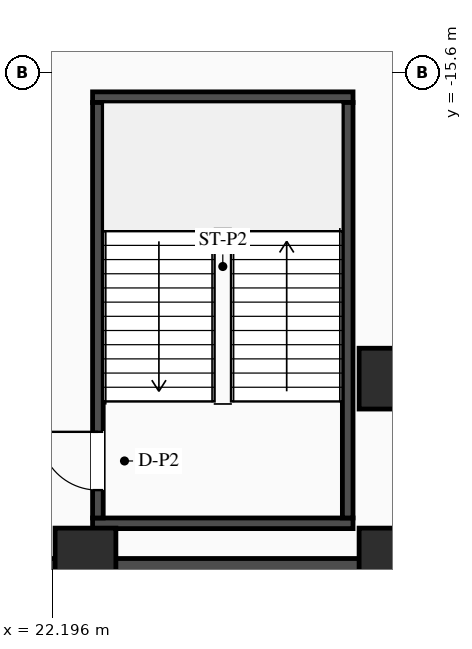
"""IFC4 building model, lengths in metres.
Left out: names, types, materials, properties, quantities, classifications, styles, units other than length and angle.
Written with IfcOpenShell. Run it as: python <this file> out.ifc"""

import sys

from ifc_helpers import new_model, si_unit, direction, frame, frame_2d, origin, origin_2d, place, context, subcontext, project, spatial, rectangle, extrude, element, fill, save


model = new_model("IFC4")
c1 = context("Model", 3, precision=1e-05, world=origin(), true_north=direction((0.0, 1.0)))
c2 = subcontext(c1, "Body", "Model", "MODEL_VIEW")
j1 = project(units=[si_unit("LENGTHUNIT", "METRE"), si_unit("PLANEANGLEUNIT", "RADIAN")], contexts=[c1])
p1 = place(None, origin())
s1 = spatial("IfcSite", under=j1, at=p1, CompositionType="ELEMENT")
p2 = place(p1, origin())
s2 = spatial("IfcBuilding", under=s1, at=p2, CompositionType="ELEMENT")
p3 = place(p2, frame((0.0, 0.0, -9.6)))
s3 = spatial("IfcBuildingStorey", under=s2, at=p3, CompositionType="ELEMENT", Elevation=-9.6)
p4 = place(p3, frame((-39.0, -25.6, 0.0), z_axis=(0.0, 0.0, 1.0), x_axis=(1.0, 0.0, 0.0)))
e1 = element("IfcWall", 1, at=p4, inside=s3, PredefinedType="SOLIDWALL", context=c2, shape_type="SweptSolid", body=[
    extrude(rectangle(XDim=78.0, YDim=0.8, at=frame_2d((39.0, 0.0))), origin(), (0.0, 0.0, 1.0), 4.5),
])
for number, where, z_axis, x_axis in (
    (2, (22.99, -24.505, 0.0), (0.0, 0.0, 1.0), (1.0, 0.0, 0.0)),
    (3, (22.99, -16.095, 0.0), (0.0, 0.0, 1.0), (1.0, 0.0, 0.0)),
):
    element("IfcWall", number, at=place(p3, frame(where, z_axis=z_axis, x_axis=x_axis)), inside=s3, PredefinedType="SHEAR", context=c2, shape_type="SweptSolid", body=[
        extrude(rectangle(XDim=5.14, YDim=0.21, at=frame_2d((2.57, 0.0))), origin(), (0.0, 0.0, 1.0), 4.5),
    ])
p5 = place(p3, frame((23.095, -24.4, 0.0), z_axis=(0.0, 0.0, 1.0), x_axis=(0.0, 1.0, 0.0)))
e4 = element("IfcWall", 4, at=p5, inside=s3, PredefinedType="SHEAR", context=c2, shape_type="SweptSolid", body=[
    extrude(rectangle(XDim=8.2, YDim=0.21, at=frame_2d((4.1, 0.0))), origin(), (0.0, 0.0, 1.0), 4.5),
])
p6 = place(p5, frame((0.55, 0.0, 0.0)))
e5 = element("IfcOpeningElement", 5, at=p6, cuts=e4, PredefinedType="OPENING", context=c2, shape_type="SweptSolid", body=[
    extrude(rectangle(XDim=1.15, YDim=2.1, at=frame_2d((0.575, 1.05))), frame((0.0, 0.115, 0.0), z_axis=(0.0, -1.0, 0.0), x_axis=(1.0, 0.0, 0.0)), (0.0, 0.0, 1.0), 0.23),
])
p7 = place(p3, frame((28.025, -24.4, 0.0), z_axis=(0.0, 0.0, 1.0), x_axis=(0.0, 1.0, 0.0)))
e6 = element("IfcWall", 6, at=p7, inside=s3, PredefinedType="SHEAR", context=c2, shape_type="SweptSolid", body=[
    extrude(rectangle(XDim=8.2, YDim=0.21, at=frame_2d((4.1, 0.0))), origin(), (0.0, 0.0, 1.0), 4.5),
])
for number, where, z_axis, x_axis in (
    (7, (28.85, -21.65, 0.0), (0.0, 0.0, 1.0), (1.0, 0.0, 0.0)),
    (8, (22.85, -25.2, 0.0), (0.0, 0.0, 1.0), (1.0, 0.0, 0.0)),
    (9, (28.85, -25.2, 0.0), (0.0, 0.0, 1.0), (1.0, 0.0, 0.0)),
):
    element("IfcColumn", number, at=place(p3, frame(where, z_axis=z_axis, x_axis=x_axis)), inside=s3, PredefinedType="COLUMN", context=c2, shape_type="SweptSolid", body=[
        extrude(rectangle(XDim=1.2, YDim=1.2, at=origin_2d()), origin(), (0.0, 0.0, 1.0), 4.8),
    ])
p8 = place(p6, origin())
e10 = element("IfcDoor", 10, at=p8, inside=s3, OperationType="SINGLE_SWING_RIGHT", PredefinedType="DOOR", context=c2, shape_type="SweptSolid", body=[
    extrude(rectangle(XDim=1.15, YDim=2.1, at=frame_2d((0.575, 1.05))), frame((0.0, 0.025, 0.0), z_axis=(0.0, -1.0, 0.0), x_axis=(1.0, 0.0, 0.0)), (0.0, 0.0, 1.0), 0.05),
])
fill(e5, e10)
save(model, sys.argv[1])
